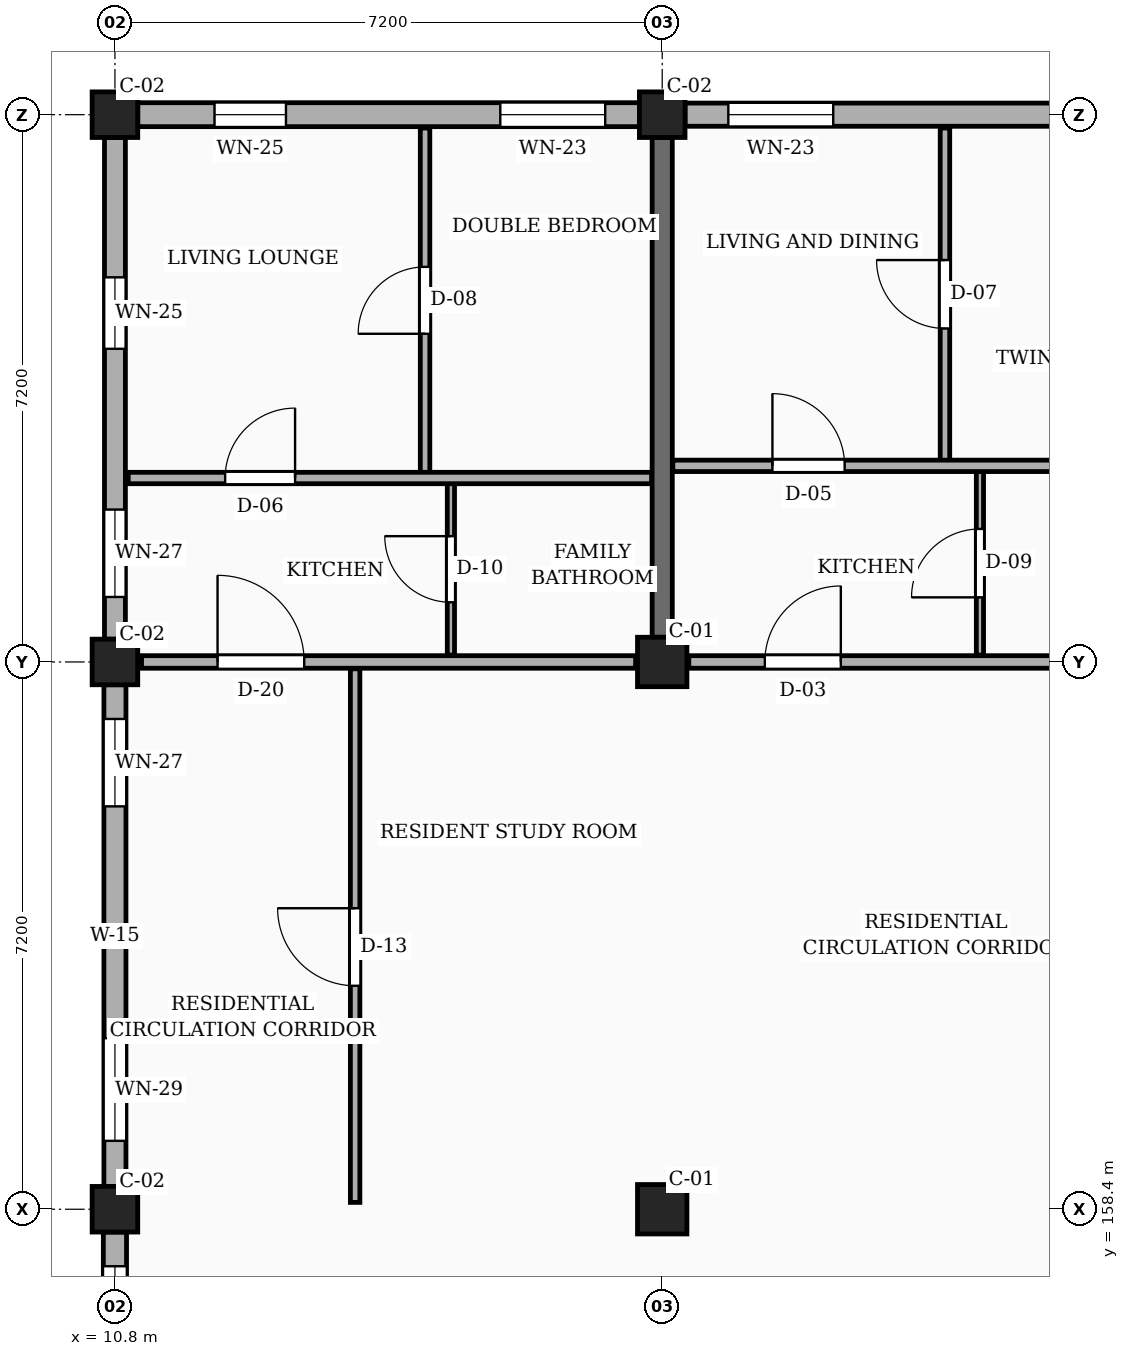
"""IFC4 building model, lengths in metres.
Left out: names, types, materials, properties, quantities, classifications, styles, units other than length and angle.
Written with IfcOpenShell. Run it as: python <this file> out.ifc"""

import sys

from ifc_helpers import new_model, si_unit, direction, frame, frame_2d, origin, origin_2d, place, context, subcontext, project, spatial, rectangle, extrude, element, fill, save


model = new_model("IFC4")
c1 = context("Model", 3, precision=1e-05, world=origin(), true_north=direction((0.0, 1.0)))
c2 = subcontext(c1, "Body", "Model", "MODEL_VIEW")
j1 = project(units=[si_unit("LENGTHUNIT", "METRE"), si_unit("PLANEANGLEUNIT", "RADIAN")], contexts=[c1])
p1 = place(None, origin())
s1 = spatial("IfcSite", under=j1, at=p1, CompositionType="ELEMENT")
p2 = place(p1, origin())
s2 = spatial("IfcBuilding", under=s1, at=p2, CompositionType="ELEMENT")
p3 = place(p2, frame((0.0, 0.0, 4.5)))
s3 = spatial("IfcBuildingStorey", under=s2, at=p3, CompositionType="ELEMENT", Elevation=4.5)
for number, where, z_axis, x_axis in (
    (1, (10.8, 158.4, 0.0), (0.0, 0.0, 1.0), (1.0, 0.0, 0.0)),
    (2, (10.8, 165.6, 0.0), (0.0, 0.0, 1.0), (1.0, 0.0, 0.0)),
    (3, (10.8, 172.8, 0.0), (0.0, 0.0, 1.0), (1.0, 0.0, 0.0)),
):
    element("IfcColumn", number, at=place(p3, frame(where, z_axis=z_axis, x_axis=x_axis)), inside=s3, PredefinedType="COLUMN", context=c2, shape_type="SweptSolid", body=[
        extrude(rectangle(XDim=0.6, YDim=0.6, at=origin_2d()), origin(), (0.0, 0.0, 1.0), 3.15),
    ])
for number, where, z_axis, x_axis in (
    (4, (18.0, 158.4, 0.0), (0.0, 0.0, 1.0), (1.0, 0.0, 0.0)),
    (5, (18.0, 165.6, 0.0), (0.0, 0.0, 1.0), (1.0, 0.0, 0.0)),
):
    element("IfcColumn", number, at=place(p3, frame(where, z_axis=z_axis, x_axis=x_axis)), inside=s3, PredefinedType="COLUMN", context=c2, shape_type="SweptSolid", body=[
        extrude(rectangle(XDim=0.65, YDim=0.65, at=origin_2d()), origin(), (0.0, 0.0, 1.0), 3.15),
    ])
p4 = place(p3, frame((18.0, 172.8, 0.0), z_axis=(0.0, 0.0, 1.0), x_axis=(1.0, 0.0, 0.0)))
e6 = element("IfcColumn", 6, at=p4, inside=s3, PredefinedType="COLUMN", context=c2, shape_type="SweptSolid", body=[
    extrude(rectangle(XDim=0.6, YDim=0.6, at=origin_2d()), origin(), (0.0, 0.0, 1.0), 3.15),
])
p5 = place(p3, frame((18.0, 165.925, 0.0), z_axis=(0.0, 0.0, 1.0), x_axis=(0.0, 1.0, 0.0)))
e7 = element("IfcWall", 7, at=p5, inside=s3, PredefinedType="SOLIDWALL", context=c2, shape_type="SweptSolid", body=[
    extrude(rectangle(XDim=6.575, YDim=0.265, at=frame_2d((3.288, 0.0))), origin(), (0.0, 0.0, 1.0), 2.185),
])
p6 = place(p3, frame((24.9, 172.8, 0.0), z_axis=(0.0, 0.0, 1.0), x_axis=(-1.0, 0.0, 0.0)))
e8 = element("IfcWall", 8, at=p6, inside=s3, PredefinedType="SOLIDWALL", context=c2, shape_type="SweptSolid", body=[
    extrude(rectangle(XDim=6.6, YDim=0.305, at=frame_2d((3.3, 0.0))), origin(), (0.0, 0.0, 1.0), 2.455),
])
p7 = place(p6, frame((0.45, 0.0, 0.78)))
e9 = element("IfcOpeningElement", 9, at=p7, cuts=e8, PredefinedType="OPENING", context=c2, shape_type="SweptSolid", body=[
    extrude(rectangle(XDim=1.22, YDim=1.36, at=frame_2d((0.61, 0.68))), frame((0.0, 0.163, 0.0), z_axis=(0.0, -1.0, 0.0), x_axis=(1.0, 0.0, 0.0)), (0.0, 0.0, 1.0), 0.325),
])
p8 = place(p6, frame((4.65, 0.0, 0.78)))
e10 = element("IfcOpeningElement", 10, at=p8, cuts=e8, PredefinedType="OPENING", context=c2, shape_type="SweptSolid", body=[
    extrude(rectangle(XDim=1.38, YDim=1.36, at=frame_2d((0.69, 0.68))), frame((0.0, 0.163, 0.0), z_axis=(0.0, -1.0, 0.0), x_axis=(1.0, 0.0, 0.0)), (0.0, 0.0, 1.0), 0.325),
])
p9 = place(p3, frame((17.7, 172.8, 0.0), z_axis=(0.0, 0.0, 1.0), x_axis=(-1.0, 0.0, 0.0)))
e11 = element("IfcWall", 11, at=p9, inside=s3, PredefinedType="SOLIDWALL", context=c2, shape_type="SweptSolid", body=[
    extrude(rectangle(XDim=6.6, YDim=0.315, at=frame_2d((3.3, 0.0))), origin(), (0.0, 0.0, 1.0), 2.455),
])
p10 = place(p9, frame((0.45, 0.0, 0.78)))
e12 = element("IfcOpeningElement", 12, at=p10, cuts=e11, PredefinedType="OPENING", context=c2, shape_type="SweptSolid", body=[
    extrude(rectangle(XDim=1.38, YDim=1.36, at=frame_2d((0.69, 0.68))), frame((0.0, 0.167, 0.0), z_axis=(0.0, -1.0, 0.0), x_axis=(1.0, 0.0, 0.0)), (0.0, 0.0, 1.0), 0.335),
])
p11 = place(p9, frame((4.65, 0.0, 0.78)))
e13 = element("IfcOpeningElement", 13, at=p11, cuts=e11, PredefinedType="OPENING", context=c2, shape_type="SweptSolid", body=[
    extrude(rectangle(XDim=0.94, YDim=1.44, at=frame_2d((0.47, 0.72))), frame((0.0, 0.167, 0.0), z_axis=(0.0, -1.0, 0.0), x_axis=(1.0, 0.0, 0.0)), (0.0, 0.0, 1.0), 0.335),
])
p12 = place(p3, frame((10.8, 172.5, 0.0), z_axis=(0.0, 0.0, 1.0), x_axis=(0.0, -1.0, 0.0)))
e14 = element("IfcWall", 14, at=p12, inside=s3, PredefinedType="SOLIDWALL", context=c2, shape_type="SweptSolid", body=[
    extrude(rectangle(XDim=6.6, YDim=0.275, at=frame_2d((3.3, 0.0))), origin(), (0.0, 0.0, 1.0), 2.455),
])
p13 = place(p12, frame((1.84, 0.0, 0.78)))
e15 = element("IfcOpeningElement", 15, at=p13, cuts=e14, PredefinedType="OPENING", context=c2, shape_type="SweptSolid", body=[
    extrude(rectangle(XDim=0.94, YDim=1.44, at=frame_2d((0.47, 0.72))), frame((0.0, 0.147, 0.0), z_axis=(0.0, -1.0, 0.0), x_axis=(1.0, 0.0, 0.0)), (0.0, 0.0, 1.0), 0.295),
])
p14 = place(p12, frame((4.895, 0.0, 0.78)))
e16 = element("IfcOpeningElement", 16, at=p14, cuts=e14, PredefinedType="OPENING", context=c2, shape_type="SweptSolid", body=[
    extrude(rectangle(XDim=1.15, YDim=1.44, at=frame_2d((0.575, 0.72))), frame((0.0, 0.147, 0.0), z_axis=(0.0, -1.0, 0.0), x_axis=(1.0, 0.0, 0.0)), (0.0, 0.0, 1.0), 0.295),
])
p15 = place(p3, frame((10.8, 165.3, 0.0), z_axis=(0.0, 0.0, 1.0), x_axis=(0.0, -1.0, 0.0)))
e17 = element("IfcWall", 17, at=p15, inside=s3, PredefinedType="SOLIDWALL", context=c2, shape_type="SweptSolid", body=[
    extrude(rectangle(XDim=6.6, YDim=0.29, at=frame_2d((3.3, 0.0))), origin(), (0.0, 0.0, 1.0), 2.455),
])
p16 = place(p15, frame((0.45, 0.0, 0.78)))
e18 = element("IfcOpeningElement", 18, at=p16, cuts=e17, PredefinedType="OPENING", context=c2, shape_type="SweptSolid", body=[
    extrude(rectangle(XDim=1.15, YDim=1.44, at=frame_2d((0.575, 0.72))), frame((0.0, 0.155, 0.0), z_axis=(0.0, -1.0, 0.0), x_axis=(1.0, 0.0, 0.0)), (0.0, 0.0, 1.0), 0.31),
])
p17 = place(p15, frame((4.65, 0.0, 0.78)))
e19 = element("IfcOpeningElement", 19, at=p17, cuts=e17, PredefinedType="OPENING", context=c2, shape_type="SweptSolid", body=[
    extrude(rectangle(XDim=1.35, YDim=1.44, at=frame_2d((0.675, 0.72))), frame((0.0, 0.155, 0.0), z_axis=(0.0, -1.0, 0.0), x_axis=(1.0, 0.0, 0.0)), (0.0, 0.0, 1.0), 0.31),
])
p18 = place(p3, frame((10.8, 158.1, 0.0), z_axis=(0.0, 0.0, 1.0), x_axis=(0.0, -1.0, 0.0)))
e20 = element("IfcWall", 20, at=p18, inside=s3, PredefinedType="SOLIDWALL", context=c2, shape_type="SweptSolid", body=[
    extrude(rectangle(XDim=6.6, YDim=0.305, at=frame_2d((3.3, 0.0))), origin(), (0.0, 0.0, 1.0), 2.455),
])
p19 = place(p18, frame((0.45, 0.0, 0.78)))
e21 = element("IfcOpeningElement", 21, at=p19, cuts=e20, PredefinedType="OPENING", context=c2, shape_type="SweptSolid", body=[
    extrude(rectangle(XDim=1.04, YDim=1.26, at=frame_2d((0.52, 0.63))), frame((0.0, 0.163, 0.0), z_axis=(0.0, -1.0, 0.0), x_axis=(1.0, 0.0, 0.0)), (0.0, 0.0, 1.0), 0.325),
])
p20 = place(p18, frame((3.58, 0.0, 0.78)))
e22 = element("IfcOpeningElement", 22, at=p20, cuts=e20, PredefinedType="OPENING", context=c2, shape_type="SweptSolid", body=[
    extrude(rectangle(XDim=0.85, YDim=1.15, at=frame_2d((0.425, 0.575))), frame((0.0, 0.163, 0.0), z_axis=(0.0, -1.0, 0.0), x_axis=(1.0, 0.0, 0.0)), (0.0, 0.0, 1.0), 0.325),
])
p21 = place(p3, frame((11.15, 165.6, 0.0), z_axis=(0.0, 0.0, 1.0), x_axis=(1.0, 0.0, 0.0)))
e23 = element("IfcWall", 23, at=p21, inside=s3, PredefinedType="PARTITIONING", context=c2, shape_type="SweptSolid", body=[
    extrude(rectangle(XDim=6.5, YDim=0.165, at=frame_2d((3.25, 0.0))), origin(), (0.0, 0.0, 1.0), 2.185),
])
p22 = place(p21, frame((1.0, 0.0, 0.0)))
e24 = element("IfcOpeningElement", 24, at=p22, cuts=e23, PredefinedType="OPENING", context=c2, shape_type="SweptSolid", body=[
    extrude(rectangle(XDim=1.14, YDim=2.18, at=frame_2d((0.57, 1.09))), frame((0.0, 0.093, 0.0), z_axis=(0.0, -1.0, 0.0), x_axis=(1.0, 0.0, 0.0)), (0.0, 0.0, 1.0), 0.185),
])
p23 = place(p3, frame((18.35, 165.6, 0.0), z_axis=(0.0, 0.0, 1.0), x_axis=(1.0, 0.0, 0.0)))
e25 = element("IfcWall", 25, at=p23, inside=s3, PredefinedType="PARTITIONING", context=c2, shape_type="SweptSolid", body=[
    extrude(rectangle(XDim=6.5, YDim=0.165, at=frame_2d((3.25, 0.0))), origin(), (0.0, 0.0, 1.0), 2.185),
])
p24 = place(p23, frame((1.0, 0.0, 0.0)))
e26 = element("IfcOpeningElement", 26, at=p24, cuts=e25, PredefinedType="OPENING", context=c2, shape_type="SweptSolid", body=[
    extrude(rectangle(XDim=1.0, YDim=2.15, at=frame_2d((0.5, 1.075))), frame((0.0, 0.093, 0.0), z_axis=(0.0, -1.0, 0.0), x_axis=(1.0, 0.0, 0.0)), (0.0, 0.0, 1.0), 0.185),
])
p25 = place(p3, frame((13.96, 158.49, 0.0), z_axis=(0.0, 0.0, 1.0), x_axis=(0.0, 1.0, 0.0)))
e27 = element("IfcWall", 27, at=p25, inside=s3, PredefinedType="PARTITIONING", context=c2, shape_type="SweptSolid", body=[
    extrude(rectangle(XDim=7.02, YDim=0.125, at=frame_2d((3.51, 0.0))), origin(), (0.0, 0.0, 1.0), 2.32),
])
p26 = place(p25, frame((2.85, 0.0, 0.0)))
e28 = element("IfcOpeningElement", 28, at=p26, cuts=e27, PredefinedType="OPENING", context=c2, shape_type="SweptSolid", body=[
    extrude(rectangle(XDim=1.02, YDim=2.15, at=frame_2d((0.51, 1.075))), frame((0.0, 0.073, 0.0), z_axis=(0.0, -1.0, 0.0), x_axis=(1.0, 0.0, 0.0)), (0.0, 0.0, 1.0), 0.145),
])
p27 = place(p3, frame((14.88, 168.09, 0.0), z_axis=(0.0, 0.0, 1.0), x_axis=(0.0, 1.0, 0.0)))
e29 = element("IfcWall", 29, at=p27, inside=s3, PredefinedType="PARTITIONING", context=c2, shape_type="SweptSolid", body=[
    extrude(rectangle(XDim=4.535, YDim=0.125, at=frame_2d((2.268, 0.0))), origin(), (0.0, 0.0, 1.0), 2.32),
])
p28 = place(p27, frame((1.827, 0.0, 0.0)))
e30 = element("IfcOpeningElement", 30, at=p28, cuts=e29, PredefinedType="OPENING", context=c2, shape_type="SweptSolid", body=[
    extrude(rectangle(XDim=0.88, YDim=2.08, at=frame_2d((0.44, 1.04))), frame((0.0, 0.073, 0.0), z_axis=(0.0, -1.0, 0.0), x_axis=(1.0, 0.0, 0.0)), (0.0, 0.0, 1.0), 0.145),
])
p29 = place(p3, frame((15.22, 165.69, 0.0), z_axis=(0.0, 0.0, 1.0), x_axis=(0.0, 1.0, 0.0)))
e31 = element("IfcWall", 31, at=p29, inside=s3, PredefinedType="PARTITIONING", context=c2, shape_type="SweptSolid", body=[
    extrude(rectangle(XDim=2.26, YDim=0.095, at=frame_2d((1.13, 0.0))), origin(), (0.0, 0.0, 1.0), 2.32),
])
p30 = place(p29, frame((0.695, 0.0, 0.0)))
e32 = element("IfcOpeningElement", 32, at=p30, cuts=e31, PredefinedType="OPENING", context=c2, shape_type="SweptSolid", body=[
    extrude(rectangle(XDim=0.87, YDim=2.05, at=frame_2d((0.435, 1.025))), frame((0.0, 0.058, 0.0), z_axis=(0.0, -1.0, 0.0), x_axis=(1.0, 0.0, 0.0)), (0.0, 0.0, 1.0), 0.115),
])
p31 = place(p3, frame((10.975, 168.02, 0.0), z_axis=(0.0, 0.0, 1.0), x_axis=(1.0, 0.0, 0.0)))
e33 = element("IfcWall", 33, at=p31, inside=s3, PredefinedType="PARTITIONING", context=c2, shape_type="SweptSolid", body=[
    extrude(rectangle(XDim=6.885, YDim=0.15, at=frame_2d((3.442, 0.0))), origin(), (0.0, 0.0, 1.0), 2.32),
])
p32 = place(p31, frame((1.275, 0.0, 0.0)))
e34 = element("IfcOpeningElement", 34, at=p32, cuts=e33, PredefinedType="OPENING", context=c2, shape_type="SweptSolid", body=[
    extrude(rectangle(XDim=0.92, YDim=2.1, at=frame_2d((0.46, 1.05))), frame((0.0, 0.085, 0.0), z_axis=(0.0, -1.0, 0.0), x_axis=(1.0, 0.0, 0.0)), (0.0, 0.0, 1.0), 0.17),
])
p33 = place(p3, frame((21.72, 168.25, 0.0), z_axis=(0.0, 0.0, 1.0), x_axis=(0.0, 1.0, 0.0)))
e35 = element("IfcWall", 35, at=p33, inside=s3, PredefinedType="PARTITIONING", context=c2, shape_type="SweptSolid", body=[
    extrude(rectangle(XDim=4.375, YDim=0.125, at=frame_2d((2.188, 0.0))), origin(), (0.0, 0.0, 1.0), 2.32),
])
p34 = place(p33, frame((1.738, 0.0, 0.0)))
e36 = element("IfcOpeningElement", 36, at=p34, cuts=e35, PredefinedType="OPENING", context=c2, shape_type="SweptSolid", body=[
    extrude(rectangle(XDim=0.9, YDim=2.1, at=frame_2d((0.45, 1.05))), frame((0.0, 0.073, 0.0), z_axis=(0.0, -1.0, 0.0), x_axis=(1.0, 0.0, 0.0)), (0.0, 0.0, 1.0), 0.145),
])
p35 = place(p3, frame((22.18, 165.69, 0.0), z_axis=(0.0, 0.0, 1.0), x_axis=(0.0, 1.0, 0.0)))
e37 = element("IfcWall", 37, at=p35, inside=s3, PredefinedType="PARTITIONING", context=c2, shape_type="SweptSolid", body=[
    extrude(rectangle(XDim=2.42, YDim=0.095, at=frame_2d((1.21, 0.0))), origin(), (0.0, 0.0, 1.0), 2.32),
])
p36 = place(p35, frame((0.76, 0.0, 0.0)))
e38 = element("IfcOpeningElement", 38, at=p36, cuts=e37, PredefinedType="OPENING", context=c2, shape_type="SweptSolid", body=[
    extrude(rectangle(XDim=0.9, YDim=2.05, at=frame_2d((0.45, 1.025))), frame((0.0, 0.058, 0.0), z_axis=(0.0, -1.0, 0.0), x_axis=(1.0, 0.0, 0.0)), (0.0, 0.0, 1.0), 0.115),
])
p37 = place(p3, frame((18.14, 168.18, 0.0), z_axis=(0.0, 0.0, 1.0), x_axis=(1.0, 0.0, 0.0)))
e39 = element("IfcWall", 39, at=p37, inside=s3, PredefinedType="PARTITIONING", context=c2, shape_type="SweptSolid", body=[
    extrude(rectangle(XDim=6.92, YDim=0.15, at=frame_2d((3.46, 0.0))), origin(), (0.0, 0.0, 1.0), 2.32),
])
p38 = place(p37, frame((1.31, 0.0, 0.0)))
e40 = element("IfcOpeningElement", 40, at=p38, cuts=e39, PredefinedType="OPENING", context=c2, shape_type="SweptSolid", body=[
    extrude(rectangle(XDim=0.95, YDim=2.1, at=frame_2d((0.475, 1.05))), frame((0.0, 0.085, 0.0), z_axis=(0.0, -1.0, 0.0), x_axis=(1.0, 0.0, 0.0)), (0.0, 0.0, 1.0), 0.17),
])
p39 = place(p8, origin())
e41 = element("IfcWindow", 41, at=p39, inside=s3, PartitioningType="SINGLE_PANEL", PredefinedType="WINDOW", context=c2, shape_type="SweptSolid", body=[
    extrude(rectangle(XDim=1.38, YDim=1.36, at=frame_2d((0.69, 0.68))), frame((0.0, 0.03, 0.0), z_axis=(0.0, -1.0, 0.0), x_axis=(1.0, 0.0, 0.0)), (0.0, 0.0, 1.0), 0.06),
])
fill(e10, e41)
p40 = place(p10, origin())
e42 = element("IfcWindow", 42, at=p40, inside=s3, PartitioningType="SINGLE_PANEL", PredefinedType="WINDOW", context=c2, shape_type="SweptSolid", body=[
    extrude(rectangle(XDim=1.38, YDim=1.36, at=frame_2d((0.69, 0.68))), frame((0.0, 0.03, 0.0), z_axis=(0.0, -1.0, 0.0), x_axis=(1.0, 0.0, 0.0)), (0.0, 0.0, 1.0), 0.06),
])
fill(e12, e42)
p41 = place(p11, origin())
e43 = element("IfcWindow", 43, at=p41, inside=s3, PartitioningType="SINGLE_PANEL", PredefinedType="WINDOW", context=c2, shape_type="SweptSolid", body=[
    extrude(rectangle(XDim=0.94, YDim=1.44, at=frame_2d((0.47, 0.72))), frame((0.0, 0.03, 0.0), z_axis=(0.0, -1.0, 0.0), x_axis=(1.0, 0.0, 0.0)), (0.0, 0.0, 1.0), 0.06),
])
fill(e13, e43)
p42 = place(p13, origin())
e44 = element("IfcWindow", 44, at=p42, inside=s3, PartitioningType="SINGLE_PANEL", PredefinedType="WINDOW", context=c2, shape_type="SweptSolid", body=[
    extrude(rectangle(XDim=0.94, YDim=1.44, at=frame_2d((0.47, 0.72))), frame((0.0, 0.03, 0.0), z_axis=(0.0, -1.0, 0.0), x_axis=(1.0, 0.0, 0.0)), (0.0, 0.0, 1.0), 0.06),
])
fill(e15, e44)
p43 = place(p14, origin())
e45 = element("IfcWindow", 45, at=p43, inside=s3, PartitioningType="SINGLE_PANEL", PredefinedType="WINDOW", context=c2, shape_type="SweptSolid", body=[
    extrude(rectangle(XDim=1.15, YDim=1.44, at=frame_2d((0.575, 0.72))), frame((0.0, 0.03, 0.0), z_axis=(0.0, -1.0, 0.0), x_axis=(1.0, 0.0, 0.0)), (0.0, 0.0, 1.0), 0.06),
])
fill(e16, e45)
p44 = place(p16, origin())
e46 = element("IfcWindow", 46, at=p44, inside=s3, PartitioningType="SINGLE_PANEL", PredefinedType="WINDOW", context=c2, shape_type="SweptSolid", body=[
    extrude(rectangle(XDim=1.15, YDim=1.44, at=frame_2d((0.575, 0.72))), frame((0.0, 0.03, 0.0), z_axis=(0.0, -1.0, 0.0), x_axis=(1.0, 0.0, 0.0)), (0.0, 0.0, 1.0), 0.06),
])
fill(e18, e46)
p45 = place(p17, origin())
e47 = element("IfcWindow", 47, at=p45, inside=s3, PartitioningType="SINGLE_PANEL", PredefinedType="WINDOW", context=c2, shape_type="SweptSolid", body=[
    extrude(rectangle(XDim=1.35, YDim=1.44, at=frame_2d((0.675, 0.72))), frame((0.0, 0.03, 0.0), z_axis=(0.0, -1.0, 0.0), x_axis=(1.0, 0.0, 0.0)), (0.0, 0.0, 1.0), 0.06),
])
fill(e19, e47)
p46 = place(p19, origin())
e48 = element("IfcWindow", 48, at=p46, inside=s3, PartitioningType="SINGLE_PANEL", PredefinedType="WINDOW", context=c2, shape_type="SweptSolid", body=[
    extrude(rectangle(XDim=1.04, YDim=1.26, at=frame_2d((0.52, 0.63))), frame((0.0, 0.03, 0.0), z_axis=(0.0, -1.0, 0.0), x_axis=(1.0, 0.0, 0.0)), (0.0, 0.0, 1.0), 0.06),
])
fill(e21, e48)
p47 = place(p22, origin())
e49 = element("IfcDoor", 49, at=p47, inside=s3, OperationType="SINGLE_SWING_LEFT", PredefinedType="DOOR", context=c2, shape_type="SweptSolid", body=[
    extrude(rectangle(XDim=1.14, YDim=2.18, at=frame_2d((0.57, 1.09))), frame((0.0, 0.025, 0.0), z_axis=(0.0, -1.0, 0.0), x_axis=(1.0, 0.0, 0.0)), (0.0, 0.0, 1.0), 0.05),
])
fill(e24, e49)
p48 = place(p24, origin())
e50 = element("IfcDoor", 50, at=p48, inside=s3, OperationType="SINGLE_SWING_RIGHT", PredefinedType="DOOR", context=c2, shape_type="SweptSolid", body=[
    extrude(rectangle(XDim=1.0, YDim=2.15, at=frame_2d((0.5, 1.075))), frame((0.0, 0.025, 0.0), z_axis=(0.0, -1.0, 0.0), x_axis=(1.0, 0.0, 0.0)), (0.0, 0.0, 1.0), 0.05),
])
fill(e26, e50)
p49 = place(p26, origin())
e51 = element("IfcDoor", 51, at=p49, inside=s3, OperationType="SINGLE_SWING_RIGHT", PredefinedType="DOOR", context=c2, shape_type="SweptSolid", body=[
    extrude(rectangle(XDim=1.02, YDim=2.15, at=frame_2d((0.51, 1.075))), frame((0.0, 0.025, 0.0), z_axis=(0.0, -1.0, 0.0), x_axis=(1.0, 0.0, 0.0)), (0.0, 0.0, 1.0), 0.05),
])
fill(e28, e51)
p50 = place(p28, origin())
e52 = element("IfcDoor", 52, at=p50, inside=s3, OperationType="SINGLE_SWING_LEFT", PredefinedType="DOOR", context=c2, shape_type="SweptSolid", body=[
    extrude(rectangle(XDim=0.88, YDim=2.08, at=frame_2d((0.44, 1.04))), frame((0.0, 0.025, 0.0), z_axis=(0.0, -1.0, 0.0), x_axis=(1.0, 0.0, 0.0)), (0.0, 0.0, 1.0), 0.05),
])
fill(e30, e52)
p51 = place(p30, origin())
e53 = element("IfcDoor", 53, at=p51, inside=s3, OperationType="SINGLE_SWING_RIGHT", PredefinedType="DOOR", context=c2, shape_type="SweptSolid", body=[
    extrude(rectangle(XDim=0.87, YDim=2.05, at=frame_2d((0.435, 1.025))), frame((0.0, 0.025, 0.0), z_axis=(0.0, -1.0, 0.0), x_axis=(1.0, 0.0, 0.0)), (0.0, 0.0, 1.0), 0.05),
])
fill(e32, e53)
p52 = place(p32, origin())
e54 = element("IfcDoor", 54, at=p52, inside=s3, OperationType="SINGLE_SWING_RIGHT", PredefinedType="DOOR", context=c2, shape_type="SweptSolid", body=[
    extrude(rectangle(XDim=0.92, YDim=2.1, at=frame_2d((0.46, 1.05))), frame((0.0, 0.025, 0.0), z_axis=(0.0, -1.0, 0.0), x_axis=(1.0, 0.0, 0.0)), (0.0, 0.0, 1.0), 0.05),
])
fill(e34, e54)
p53 = place(p34, origin())
e55 = element("IfcDoor", 55, at=p53, inside=s3, OperationType="SINGLE_SWING_RIGHT", PredefinedType="DOOR", context=c2, shape_type="SweptSolid", body=[
    extrude(rectangle(XDim=0.9, YDim=2.1, at=frame_2d((0.45, 1.05))), frame((0.0, 0.025, 0.0), z_axis=(0.0, -1.0, 0.0), x_axis=(1.0, 0.0, 0.0)), (0.0, 0.0, 1.0), 0.05),
])
fill(e36, e55)
p54 = place(p36, origin())
e56 = element("IfcDoor", 56, at=p54, inside=s3, OperationType="SINGLE_SWING_LEFT", PredefinedType="DOOR", context=c2, shape_type="SweptSolid", body=[
    extrude(rectangle(XDim=0.9, YDim=2.05, at=frame_2d((0.45, 1.025))), frame((0.0, 0.025, 0.0), z_axis=(0.0, -1.0, 0.0), x_axis=(1.0, 0.0, 0.0)), (0.0, 0.0, 1.0), 0.05),
])
fill(e38, e56)
p55 = place(p38, origin())
e57 = element("IfcDoor", 57, at=p55, inside=s3, OperationType="SINGLE_SWING_LEFT", PredefinedType="DOOR", context=c2, shape_type="SweptSolid", body=[
    extrude(rectangle(XDim=0.95, YDim=2.1, at=frame_2d((0.475, 1.05))), frame((0.0, 0.025, 0.0), z_axis=(0.0, -1.0, 0.0), x_axis=(1.0, 0.0, 0.0)), (0.0, 0.0, 1.0), 0.05),
])
fill(e40, e57)
save(model, sys.argv[1])
